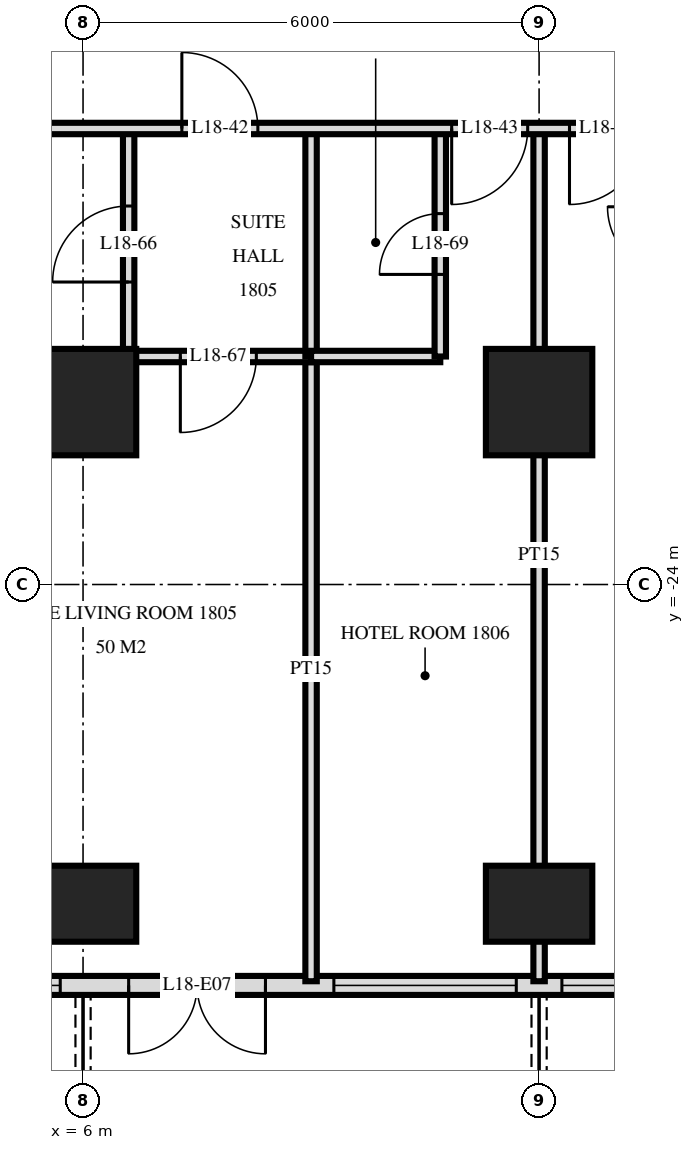
"""IFC4 building model, lengths in metres.
Left out: names, types, materials, properties, quantities, classifications, styles, units other than length and angle.
Written with IfcOpenShell. Run it as: python <this file> out.ifc"""

import sys

from ifc_helpers import new_model, si_unit, direction, frame, frame_2d, origin, origin_2d, place, context, subcontext, project, spatial, rectangle, extrude, element, fill, save


model = new_model("IFC4")
c1 = context("Model", 3, precision=1e-05, world=origin(), true_north=direction((0.0, 1.0)))
c2 = subcontext(c1, "Body", "Model", "MODEL_VIEW")
j1 = project(units=[si_unit("LENGTHUNIT", "METRE"), si_unit("PLANEANGLEUNIT", "RADIAN")], contexts=[c1])
p1 = place(None, origin())
s1 = spatial("IfcSite", under=j1, at=p1, CompositionType="ELEMENT")
p2 = place(p1, origin())
s2 = spatial("IfcBuilding", under=s1, at=p2, CompositionType="ELEMENT")
p3 = place(p2, frame((0.0, 0.0, 74.4)))
s3 = spatial("IfcBuildingStorey", under=s2, at=p3, CompositionType="ELEMENT", Elevation=74.4)
p4 = place(p3, frame((6.0, -28.2, 0.0), z_axis=(0.0, 0.0, 1.0), x_axis=(1.0, 0.0, 0.0)))
e1 = element("IfcColumn", 1, at=p4, inside=s3, PredefinedType="COLUMN", context=c2, shape_type="SweptSolid", body=[
    extrude(rectangle(XDim=1.4, YDim=1.0, at=origin_2d()), origin(), (0.0, 0.0, 1.0), 3.6),
])
p5 = place(p3, frame((6.0, -21.6, 0.0), z_axis=(0.0, 0.0, 1.0), x_axis=(1.0, 0.0, 0.0)))
e2 = element("IfcColumn", 2, at=p5, inside=s3, PredefinedType="COLUMN", context=c2, shape_type="SweptSolid", body=[
    extrude(rectangle(XDim=1.4, YDim=1.4, at=origin_2d()), origin(), (0.0, 0.0, 1.0), 3.6),
])
p6 = place(p3, frame((12.0, -28.2, 0.0), z_axis=(0.0, 0.0, 1.0), x_axis=(1.0, 0.0, 0.0)))
e3 = element("IfcColumn", 3, at=p6, inside=s3, PredefinedType="COLUMN", context=c2, shape_type="SweptSolid", body=[
    extrude(rectangle(XDim=1.4, YDim=1.0, at=origin_2d()), origin(), (0.0, 0.0, 1.0), 3.6),
])
p7 = place(p3, frame((12.0, -21.6, 0.0), z_axis=(0.0, 0.0, 1.0), x_axis=(1.0, 0.0, 0.0)))
e4 = element("IfcColumn", 4, at=p7, inside=s3, PredefinedType="COLUMN", context=c2, shape_type="SweptSolid", body=[
    extrude(rectangle(XDim=1.4, YDim=1.4, at=origin_2d()), origin(), (0.0, 0.0, 1.0), 3.6),
])
p8 = place(p3, frame((-28.775, -29.275, 0.0), z_axis=(0.0, 0.0, 1.0), x_axis=(1.0, 0.0, 0.0)))
e5 = element("IfcWall", 5, at=p8, inside=s3, PredefinedType="SOLIDWALL", context=c2, shape_type="SweptSolid", body=[
    extrude(rectangle(XDim=57.551, YDim=0.25, at=frame_2d((28.775, 0.0))), origin(), (0.0, 0.0, 1.0), 3.32),
])
p9 = place(p8, frame((0.575, 0.0, 0.0)))
e6 = element("IfcOpeningElement", 6, at=p9, cuts=e5, PredefinedType="OPENING", context=c2, shape_type="SweptSolid", body=[
    extrude(rectangle(XDim=1.8, YDim=2.4, at=frame_2d((0.9, 1.2))), frame((0.0, 0.135, 0.0), z_axis=(0.0, -1.0, 0.0), x_axis=(1.0, 0.0, 0.0)), (0.0, 0.0, 1.0), 0.27),
])
p10 = place(p8, frame((5.075, 0.0, 0.3)))
e7 = element("IfcOpeningElement", 7, at=p10, cuts=e5, PredefinedType="OPENING", context=c2, shape_type="SweptSolid", body=[
    extrude(rectangle(XDim=2.4, YDim=2.1, at=frame_2d((1.2, 1.05))), frame((0.0, 0.135, 0.0), z_axis=(0.0, -1.0, 0.0), x_axis=(1.0, 0.0, 0.0)), (0.0, 0.0, 1.0), 0.27),
])
p11 = place(p8, frame((8.375, 0.0, 0.0)))
e8 = element("IfcOpeningElement", 8, at=p11, cuts=e5, PredefinedType="OPENING", context=c2, shape_type="SweptSolid", body=[
    extrude(rectangle(XDim=1.8, YDim=2.4, at=frame_2d((0.9, 1.2))), frame((0.0, 0.135, 0.0), z_axis=(0.0, -1.0, 0.0), x_axis=(1.0, 0.0, 0.0)), (0.0, 0.0, 1.0), 0.27),
])
p12 = place(p8, frame((11.375, 0.0, 0.0)))
e9 = element("IfcOpeningElement", 9, at=p12, cuts=e5, PredefinedType="OPENING", context=c2, shape_type="SweptSolid", body=[
    extrude(rectangle(XDim=1.8, YDim=2.4, at=frame_2d((0.9, 1.2))), frame((0.0, 0.135, 0.0), z_axis=(0.0, -1.0, 0.0), x_axis=(1.0, 0.0, 0.0)), (0.0, 0.0, 1.0), 0.27),
])
p13 = place(p8, frame((14.075, 0.0, 0.3)))
e10 = element("IfcOpeningElement", 10, at=p13, cuts=e5, PredefinedType="OPENING", context=c2, shape_type="SweptSolid", body=[
    extrude(rectangle(XDim=2.4, YDim=2.1, at=frame_2d((1.2, 1.05))), frame((0.0, 0.135, 0.0), z_axis=(0.0, -1.0, 0.0), x_axis=(1.0, 0.0, 0.0)), (0.0, 0.0, 1.0), 0.27),
])
p14 = place(p8, frame((17.375, 0.0, 0.0)))
e11 = element("IfcOpeningElement", 11, at=p14, cuts=e5, PredefinedType="OPENING", context=c2, shape_type="SweptSolid", body=[
    extrude(rectangle(XDim=1.8, YDim=2.4, at=frame_2d((0.9, 1.2))), frame((0.0, 0.135, 0.0), z_axis=(0.0, -1.0, 0.0), x_axis=(1.0, 0.0, 0.0)), (0.0, 0.0, 1.0), 0.27),
])
p15 = place(p8, frame((20.075, 0.0, 0.3)))
e12 = element("IfcOpeningElement", 12, at=p15, cuts=e5, PredefinedType="OPENING", context=c2, shape_type="SweptSolid", body=[
    extrude(rectangle(XDim=2.4, YDim=2.1, at=frame_2d((1.2, 1.05))), frame((0.0, 0.135, 0.0), z_axis=(0.0, -1.0, 0.0), x_axis=(1.0, 0.0, 0.0)), (0.0, 0.0, 1.0), 0.27),
])
p16 = place(p8, frame((23.075, 0.0, 0.3)))
e13 = element("IfcOpeningElement", 13, at=p16, cuts=e5, PredefinedType="OPENING", context=c2, shape_type="SweptSolid", body=[
    extrude(rectangle(XDim=2.4, YDim=2.1, at=frame_2d((1.2, 1.05))), frame((0.0, 0.135, 0.0), z_axis=(0.0, -1.0, 0.0), x_axis=(1.0, 0.0, 0.0)), (0.0, 0.0, 1.0), 0.27),
])
p17 = place(p8, frame((26.375, 0.0, 0.0)))
e14 = element("IfcOpeningElement", 14, at=p17, cuts=e5, PredefinedType="OPENING", context=c2, shape_type="SweptSolid", body=[
    extrude(rectangle(XDim=1.8, YDim=2.4, at=frame_2d((0.9, 1.2))), frame((0.0, 0.135, 0.0), z_axis=(0.0, -1.0, 0.0), x_axis=(1.0, 0.0, 0.0)), (0.0, 0.0, 1.0), 0.27),
])
p18 = place(p8, frame((29.375, 0.0, 0.0)))
e15 = element("IfcOpeningElement", 15, at=p18, cuts=e5, PredefinedType="OPENING", context=c2, shape_type="SweptSolid", body=[
    extrude(rectangle(XDim=1.8, YDim=2.4, at=frame_2d((0.9, 1.2))), frame((0.0, 0.135, 0.0), z_axis=(0.0, -1.0, 0.0), x_axis=(1.0, 0.0, 0.0)), (0.0, 0.0, 1.0), 0.27),
])
p19 = place(p8, frame((32.075, 0.0, 0.3)))
e16 = element("IfcOpeningElement", 16, at=p19, cuts=e5, PredefinedType="OPENING", context=c2, shape_type="SweptSolid", body=[
    extrude(rectangle(XDim=2.4, YDim=2.1, at=frame_2d((1.2, 1.05))), frame((0.0, 0.135, 0.0), z_axis=(0.0, -1.0, 0.0), x_axis=(1.0, 0.0, 0.0)), (0.0, 0.0, 1.0), 0.27),
])
p20 = place(p8, frame((35.375, 0.0, 0.0)))
e17 = element("IfcOpeningElement", 17, at=p20, cuts=e5, PredefinedType="OPENING", context=c2, shape_type="SweptSolid", body=[
    extrude(rectangle(XDim=1.8, YDim=2.4, at=frame_2d((0.9, 1.2))), frame((0.0, 0.135, 0.0), z_axis=(0.0, -1.0, 0.0), x_axis=(1.0, 0.0, 0.0)), (0.0, 0.0, 1.0), 0.27),
])
p21 = place(p8, frame((38.075, 0.0, 0.3)))
e18 = element("IfcOpeningElement", 18, at=p21, cuts=e5, PredefinedType="OPENING", context=c2, shape_type="SweptSolid", body=[
    extrude(rectangle(XDim=2.4, YDim=2.1, at=frame_2d((1.2, 1.05))), frame((0.0, 0.135, 0.0), z_axis=(0.0, -1.0, 0.0), x_axis=(1.0, 0.0, 0.0)), (0.0, 0.0, 1.0), 0.27),
])
p22 = place(p8, frame((41.075, 0.0, 0.3)))
e19 = element("IfcOpeningElement", 19, at=p22, cuts=e5, PredefinedType="OPENING", context=c2, shape_type="SweptSolid", body=[
    extrude(rectangle(XDim=2.4, YDim=2.1, at=frame_2d((1.2, 1.05))), frame((0.0, 0.135, 0.0), z_axis=(0.0, -1.0, 0.0), x_axis=(1.0, 0.0, 0.0)), (0.0, 0.0, 1.0), 0.27),
])
p23 = place(p8, frame((44.375, 0.0, 0.0)))
e20 = element("IfcOpeningElement", 20, at=p23, cuts=e5, PredefinedType="OPENING", context=c2, shape_type="SweptSolid", body=[
    extrude(rectangle(XDim=1.8, YDim=2.4, at=frame_2d((0.9, 1.2))), frame((0.0, 0.135, 0.0), z_axis=(0.0, -1.0, 0.0), x_axis=(1.0, 0.0, 0.0)), (0.0, 0.0, 1.0), 0.27),
])
p24 = place(p8, frame((47.075, 0.0, 0.3)))
e21 = element("IfcOpeningElement", 21, at=p24, cuts=e5, PredefinedType="OPENING", context=c2, shape_type="SweptSolid", body=[
    extrude(rectangle(XDim=2.4, YDim=2.1, at=frame_2d((1.2, 1.05))), frame((0.0, 0.135, 0.0), z_axis=(0.0, -1.0, 0.0), x_axis=(1.0, 0.0, 0.0)), (0.0, 0.0, 1.0), 0.27),
])
p25 = place(p8, frame((50.375, 0.0, 0.0)))
e22 = element("IfcOpeningElement", 22, at=p25, cuts=e5, PredefinedType="OPENING", context=c2, shape_type="SweptSolid", body=[
    extrude(rectangle(XDim=1.8, YDim=2.4, at=frame_2d((0.9, 1.2))), frame((0.0, 0.135, 0.0), z_axis=(0.0, -1.0, 0.0), x_axis=(1.0, 0.0, 0.0)), (0.0, 0.0, 1.0), 0.27),
])
p26 = place(p8, frame((53.375, 0.0, 0.0)))
e23 = element("IfcOpeningElement", 23, at=p26, cuts=e5, PredefinedType="OPENING", context=c2, shape_type="SweptSolid", body=[
    extrude(rectangle(XDim=1.8, YDim=2.4, at=frame_2d((0.9, 1.2))), frame((0.0, 0.135, 0.0), z_axis=(0.0, -1.0, 0.0), x_axis=(1.0, 0.0, 0.0)), (0.0, 0.0, 1.0), 0.27),
])
p27 = place(p3, frame((12.0, -29.22, 0.0), z_axis=(0.0, 0.0, 1.0), x_axis=(0.0, 1.0, 0.0)))
e24 = element("IfcWall", 24, at=p27, inside=s3, PredefinedType="PARTITIONING", context=c2, shape_type="SweptSolid", body=[
    extrude(rectangle(XDim=11.22, YDim=0.15, at=frame_2d((5.61, 0.0))), origin(), (0.0, 0.0, 1.0), 3.32),
])
p28 = place(p3, frame((10.7, -21.0, 0.0), z_axis=(0.0, 0.0, 1.0), x_axis=(0.0, 1.0, 0.0)))
e25 = element("IfcWall", 25, at=p28, inside=s3, PredefinedType="PARTITIONING", context=c2, shape_type="SweptSolid", body=[
    extrude(rectangle(XDim=3.0, YDim=0.15, at=frame_2d((1.5, 0.0))), origin(), (0.0, 0.0, 1.0), 3.32),
])
p29 = place(p28, frame((1.08, 0.0, 0.0)))
e26 = element("IfcOpeningElement", 26, at=p29, cuts=e25, PredefinedType="OPENING", context=c2, shape_type="SweptSolid", body=[
    extrude(rectangle(XDim=0.8, YDim=2.1, at=frame_2d((0.4, 1.05))), frame((0.0, 0.085, 0.0), z_axis=(0.0, -1.0, 0.0), x_axis=(1.0, 0.0, 0.0)), (0.0, 0.0, 1.0), 0.17),
])
p30 = place(p3, frame((9.0, -21.0, 0.0), z_axis=(0.0, 0.0, 1.0), x_axis=(0.0, 1.0, 0.0)))
e27 = element("IfcWall", 27, at=p30, inside=s3, PredefinedType="PARTITIONING", context=c2, shape_type="SweptSolid", body=[
    extrude(rectangle(XDim=3.0, YDim=0.15, at=frame_2d((1.5, 0.0))), origin(), (0.0, 0.0, 1.0), 3.32),
])
p31 = place(p3, frame((9.0, -29.22, 0.0), z_axis=(0.0, 0.0, 1.0), x_axis=(0.0, 1.0, 0.0)))
e28 = element("IfcWall", 28, at=p31, inside=s3, PredefinedType="PARTITIONING", context=c2, shape_type="SweptSolid", body=[
    extrude(rectangle(XDim=8.22, YDim=0.15, at=frame_2d((4.11, 0.0))), origin(), (0.0, 0.0, 1.0), 3.32),
])
p32 = place(p3, frame((6.6, -21.0, 0.0), z_axis=(0.0, 0.0, 1.0), x_axis=(0.0, 1.0, 0.0)))
e29 = element("IfcWall", 29, at=p32, inside=s3, PredefinedType="PARTITIONING", context=c2, shape_type="SweptSolid", body=[
    extrude(rectangle(XDim=3.0, YDim=0.15, at=frame_2d((1.5, 0.0))), origin(), (0.0, 0.0, 1.0), 3.32),
])
p33 = place(p32, frame((0.98, 0.0, 0.0)))
e30 = element("IfcOpeningElement", 30, at=p33, cuts=e29, PredefinedType="OPENING", context=c2, shape_type="SweptSolid", body=[
    extrude(rectangle(XDim=1.0, YDim=2.1, at=frame_2d((0.5, 1.05))), frame((0.0, 0.085, 0.0), z_axis=(0.0, -1.0, 0.0), x_axis=(1.0, 0.0, 0.0)), (0.0, 0.0, 1.0), 0.17),
])
p34 = place(p3, frame((6.6, -21.0, 0.0), z_axis=(0.0, 0.0, 1.0), x_axis=(1.0, 0.0, 0.0)))
e31 = element("IfcWall", 31, at=p34, inside=s3, PredefinedType="PARTITIONING", context=c2, shape_type="SweptSolid", body=[
    extrude(rectangle(XDim=2.4, YDim=0.15, at=frame_2d((1.2, 0.0))), origin(), (0.0, 0.0, 1.0), 3.32),
])
p35 = place(p34, frame((0.68, 0.0, 0.0)))
e32 = element("IfcOpeningElement", 32, at=p35, cuts=e31, PredefinedType="OPENING", context=c2, shape_type="SweptSolid", body=[
    extrude(rectangle(XDim=1.0, YDim=2.1, at=frame_2d((0.5, 1.05))), frame((0.0, 0.085, 0.0), z_axis=(0.0, -1.0, 0.0), x_axis=(1.0, 0.0, 0.0)), (0.0, 0.0, 1.0), 0.17),
])
p36 = place(p3, frame((1.5, -21.0, 0.0), z_axis=(0.0, 0.0, 1.0), x_axis=(1.0, 0.0, 0.0)))
e33 = element("IfcWall", 33, at=p36, inside=s3, PredefinedType="PARTITIONING", context=c2, shape_type="SweptSolid", body=[
    extrude(rectangle(XDim=5.1, YDim=0.15, at=frame_2d((2.55, 0.0))), origin(), (0.0, 0.0, 1.0), 3.32),
])
p37 = place(p36, frame((0.28, 0.0, 0.0)))
e34 = element("IfcOpeningElement", 34, at=p37, cuts=e33, PredefinedType="OPENING", context=c2, shape_type="SweptSolid", body=[
    extrude(rectangle(XDim=0.9, YDim=2.1, at=frame_2d((0.45, 1.05))), frame((0.0, 0.085, 0.0), z_axis=(0.0, -1.0, 0.0), x_axis=(1.0, 0.0, 0.0)), (0.0, 0.0, 1.0), 0.17),
])
p38 = place(p3, frame((9.0, -21.0, 0.0), z_axis=(0.0, 0.0, 1.0), x_axis=(1.0, 0.0, 0.0)))
e35 = element("IfcWall", 35, at=p38, inside=s3, PredefinedType="PARTITIONING", context=c2, shape_type="SweptSolid", body=[
    extrude(rectangle(XDim=1.7, YDim=0.15, at=frame_2d((0.85, 0.0))), origin(), (0.0, 0.0, 1.0), 3.32),
])
p39 = place(p3, frame((-33.12, -18.0, 0.0), z_axis=(0.0, 0.0, 1.0), x_axis=(1.0, 0.0, 0.0)))
e36 = element("IfcWall", 36, at=p39, inside=s3, PredefinedType="PARTITIONING", context=c2, shape_type="SweptSolid", body=[
    extrude(rectangle(XDim=66.24, YDim=0.15, at=frame_2d((33.12, 0.0))), origin(), (0.0, 0.0, 1.0), 3.32),
])
p40 = place(p39, frame((15.27, 0.0, 0.0)))
e37 = element("IfcOpeningElement", 37, at=p40, cuts=e36, PredefinedType="OPENING", context=c2, shape_type="SweptSolid", body=[
    extrude(rectangle(XDim=1.0, YDim=2.1, at=frame_2d((0.5, 1.05))), frame((0.0, 0.085, 0.0), z_axis=(0.0, -1.0, 0.0), x_axis=(1.0, 0.0, 0.0)), (0.0, 0.0, 1.0), 0.17),
])
p41 = place(p39, frame((21.22, 0.0, 0.0)))
e38 = element("IfcOpeningElement", 38, at=p41, cuts=e36, PredefinedType="OPENING", context=c2, shape_type="SweptSolid", body=[
    extrude(rectangle(XDim=1.0, YDim=2.1, at=frame_2d((0.5, 1.05))), frame((0.0, 0.085, 0.0), z_axis=(0.0, -1.0, 0.0), x_axis=(1.0, 0.0, 0.0)), (0.0, 0.0, 1.0), 0.17),
])
p42 = place(p39, frame((24.27, 0.0, 0.0)))
e39 = element("IfcOpeningElement", 39, at=p42, cuts=e36, PredefinedType="OPENING", context=c2, shape_type="SweptSolid", body=[
    extrude(rectangle(XDim=1.0, YDim=2.1, at=frame_2d((0.5, 1.05))), frame((0.0, 0.085, 0.0), z_axis=(0.0, -1.0, 0.0), x_axis=(1.0, 0.0, 0.0)), (0.0, 0.0, 1.0), 0.17),
])
p43 = place(p39, frame((30.97, 0.0, 0.0)))
e40 = element("IfcOpeningElement", 40, at=p43, cuts=e36, PredefinedType="OPENING", context=c2, shape_type="SweptSolid", body=[
    extrude(rectangle(XDim=1.0, YDim=2.1, at=frame_2d((0.5, 1.05))), frame((0.0, 0.085, 0.0), z_axis=(0.0, -1.0, 0.0), x_axis=(1.0, 0.0, 0.0)), (0.0, 0.0, 1.0), 0.17),
])
p44 = place(p39, frame((40.42, 0.0, 0.0)))
e41 = element("IfcOpeningElement", 41, at=p44, cuts=e36, PredefinedType="OPENING", context=c2, shape_type="SweptSolid", body=[
    extrude(rectangle(XDim=1.0, YDim=2.1, at=frame_2d((0.5, 1.05))), frame((0.0, 0.085, 0.0), z_axis=(0.0, -1.0, 0.0), x_axis=(1.0, 0.0, 0.0)), (0.0, 0.0, 1.0), 0.17),
])
p45 = place(p39, frame((43.97, 0.0, 0.0)))
e42 = element("IfcOpeningElement", 42, at=p45, cuts=e36, PredefinedType="OPENING", context=c2, shape_type="SweptSolid", body=[
    extrude(rectangle(XDim=1.0, YDim=2.1, at=frame_2d((0.5, 1.05))), frame((0.0, 0.085, 0.0), z_axis=(0.0, -1.0, 0.0), x_axis=(1.0, 0.0, 0.0)), (0.0, 0.0, 1.0), 0.17),
])
p46 = place(p39, frame((45.52, 0.0, 0.0)))
e43 = element("IfcOpeningElement", 43, at=p46, cuts=e36, PredefinedType="OPENING", context=c2, shape_type="SweptSolid", body=[
    extrude(rectangle(XDim=1.0, YDim=2.1, at=frame_2d((0.5, 1.05))), frame((0.0, 0.085, 0.0), z_axis=(0.0, -1.0, 0.0), x_axis=(1.0, 0.0, 0.0)), (0.0, 0.0, 1.0), 0.17),
])
p47 = place(p39, frame((52.97, 0.0, 0.0)))
e44 = element("IfcOpeningElement", 44, at=p47, cuts=e36, PredefinedType="OPENING", context=c2, shape_type="SweptSolid", body=[
    extrude(rectangle(XDim=1.0, YDim=2.1, at=frame_2d((0.5, 1.05))), frame((0.0, 0.085, 0.0), z_axis=(0.0, -1.0, 0.0), x_axis=(1.0, 0.0, 0.0)), (0.0, 0.0, 1.0), 0.17),
])
p48 = place(p39, frame((54.27, 0.0, 0.0)))
e45 = element("IfcOpeningElement", 45, at=p48, cuts=e36, PredefinedType="OPENING", context=c2, shape_type="SweptSolid", body=[
    extrude(rectangle(XDim=1.0, YDim=2.1, at=frame_2d((0.5, 1.05))), frame((0.0, 0.085, 0.0), z_axis=(0.0, -1.0, 0.0), x_axis=(1.0, 0.0, 0.0)), (0.0, 0.0, 1.0), 0.17),
])
p49 = place(p39, frame((13.42, 0.0, 0.0)))
e46 = element("IfcOpeningElement", 46, at=p49, cuts=e36, PredefinedType="OPENING", context=c2, shape_type="SweptSolid", body=[
    extrude(rectangle(XDim=1.0, YDim=2.1, at=frame_2d((0.5, 1.05))), frame((0.0, 0.085, 0.0), z_axis=(0.0, -1.0, 0.0), x_axis=(1.0, 0.0, 0.0)), (0.0, 0.0, 1.0), 0.17),
])
p50 = place(p39, frame((60.82, 0.0, 0.0)))
e47 = element("IfcOpeningElement", 47, at=p50, cuts=e36, PredefinedType="OPENING", context=c2, shape_type="SweptSolid", body=[
    extrude(rectangle(XDim=1.0, YDim=2.1, at=frame_2d((0.5, 1.05))), frame((0.0, 0.085, 0.0), z_axis=(0.0, -1.0, 0.0), x_axis=(1.0, 0.0, 0.0)), (0.0, 0.0, 1.0), 0.17),
])
p51 = place(p19, origin())
e48 = element("IfcWindow", 48, at=p51, inside=s3, PartitioningType="SINGLE_PANEL", PredefinedType="WINDOW", context=c2, shape_type="SweptSolid", body=[
    extrude(rectangle(XDim=2.4, YDim=2.1, at=frame_2d((1.2, 1.05))), frame((0.0, 0.03, 0.0), z_axis=(0.0, -1.0, 0.0), x_axis=(1.0, 0.0, 0.0)), (0.0, 0.0, 1.0), 0.06),
])
fill(e16, e48)
p52 = place(p20, frame((0.9, 0.0, 0.0), z_axis=(0.0, 0.0, 1.0), x_axis=(-1.0, 0.0, 0.0)))
e49 = element("IfcDoor", 49, at=p52, inside=s3, OperationType="DOUBLE_DOOR_SINGLE_SWING", PredefinedType="DOOR", context=c2, shape_type="SweptSolid", body=[
    extrude(rectangle(XDim=1.8, YDim=2.4, at=frame_2d((0.0, 1.2))), frame((0.0, -0.025, 0.0), z_axis=(0.0, 1.0, 0.0), x_axis=(-1.0, 0.0, 0.0)), (0.0, 0.0, 1.0), 0.05),
])
fill(e17, e49)
p53 = place(p21, origin())
e50 = element("IfcWindow", 50, at=p53, inside=s3, PartitioningType="SINGLE_PANEL", PredefinedType="WINDOW", context=c2, shape_type="SweptSolid", body=[
    extrude(rectangle(XDim=2.4, YDim=2.1, at=frame_2d((1.2, 1.05))), frame((0.0, 0.03, 0.0), z_axis=(0.0, -1.0, 0.0), x_axis=(1.0, 0.0, 0.0)), (0.0, 0.0, 1.0), 0.06),
])
fill(e18, e50)
p54 = place(p22, origin())
e51 = element("IfcWindow", 51, at=p54, inside=s3, PartitioningType="SINGLE_PANEL", PredefinedType="WINDOW", context=c2, shape_type="SweptSolid", body=[
    extrude(rectangle(XDim=2.4, YDim=2.1, at=frame_2d((1.2, 1.05))), frame((0.0, 0.03, 0.0), z_axis=(0.0, -1.0, 0.0), x_axis=(1.0, 0.0, 0.0)), (0.0, 0.0, 1.0), 0.06),
])
fill(e19, e51)
p55 = place(p44, origin())
e52 = element("IfcDoor", 52, at=p55, inside=s3, OperationType="SINGLE_SWING_RIGHT", PredefinedType="DOOR", context=c2, shape_type="SweptSolid", body=[
    extrude(rectangle(XDim=1.0, YDim=2.1, at=frame_2d((0.5, 1.05))), frame((0.0, 0.025, 0.0), z_axis=(0.0, -1.0, 0.0), x_axis=(1.0, 0.0, 0.0)), (0.0, 0.0, 1.0), 0.05),
])
fill(e41, e52)
p56 = place(p45, frame((0.5, 0.0, 0.0), z_axis=(0.0, 0.0, 1.0), x_axis=(-1.0, 0.0, 0.0)))
e53 = element("IfcDoor", 53, at=p56, inside=s3, OperationType="SINGLE_SWING_LEFT", PredefinedType="DOOR", context=c2, shape_type="SweptSolid", body=[
    extrude(rectangle(XDim=1.0, YDim=2.1, at=frame_2d((0.0, 1.05))), frame((0.0, -0.025, 0.0), z_axis=(0.0, 1.0, 0.0), x_axis=(-1.0, 0.0, 0.0)), (0.0, 0.0, 1.0), 0.05),
])
fill(e42, e53)
p57 = place(p46, frame((0.5, 0.0, 0.0), z_axis=(0.0, 0.0, 1.0), x_axis=(-1.0, 0.0, 0.0)))
e54 = element("IfcDoor", 54, at=p57, inside=s3, OperationType="SINGLE_SWING_LEFT", PredefinedType="DOOR", context=c2, shape_type="SweptSolid", body=[
    extrude(rectangle(XDim=1.0, YDim=2.1, at=frame_2d((0.0, 1.05))), frame((0.0, -0.025, 0.0), z_axis=(0.0, 1.0, 0.0), x_axis=(-1.0, 0.0, 0.0)), (0.0, 0.0, 1.0), 0.05),
])
fill(e43, e54)
p58 = place(p33, origin())
e55 = element("IfcDoor", 55, at=p58, inside=s3, OperationType="SINGLE_SWING_RIGHT", PredefinedType="DOOR", context=c2, shape_type="SweptSolid", body=[
    extrude(rectangle(XDim=1.0, YDim=2.1, at=frame_2d((0.5, 1.05))), frame((0.0, 0.025, 0.0), z_axis=(0.0, -1.0, 0.0), x_axis=(1.0, 0.0, 0.0)), (0.0, 0.0, 1.0), 0.05),
])
fill(e30, e55)
p59 = place(p35, frame((0.5, 0.0, 0.0), z_axis=(0.0, 0.0, 1.0), x_axis=(-1.0, 0.0, 0.0)))
e56 = element("IfcDoor", 56, at=p59, inside=s3, OperationType="SINGLE_SWING_LEFT", PredefinedType="DOOR", context=c2, shape_type="SweptSolid", body=[
    extrude(rectangle(XDim=1.0, YDim=2.1, at=frame_2d((0.0, 1.05))), frame((0.0, -0.025, 0.0), z_axis=(0.0, 1.0, 0.0), x_axis=(-1.0, 0.0, 0.0)), (0.0, 0.0, 1.0), 0.05),
])
fill(e32, e56)
p60 = place(p29, origin())
e57 = element("IfcDoor", 57, at=p60, inside=s3, OperationType="SINGLE_SWING_RIGHT", PredefinedType="DOOR", context=c2, shape_type="SweptSolid", body=[
    extrude(rectangle(XDim=0.8, YDim=2.1, at=frame_2d((0.4, 1.05))), frame((0.0, 0.025, 0.0), z_axis=(0.0, -1.0, 0.0), x_axis=(1.0, 0.0, 0.0)), (0.0, 0.0, 1.0), 0.05),
])
fill(e26, e57)
save(model, sys.argv[1])
